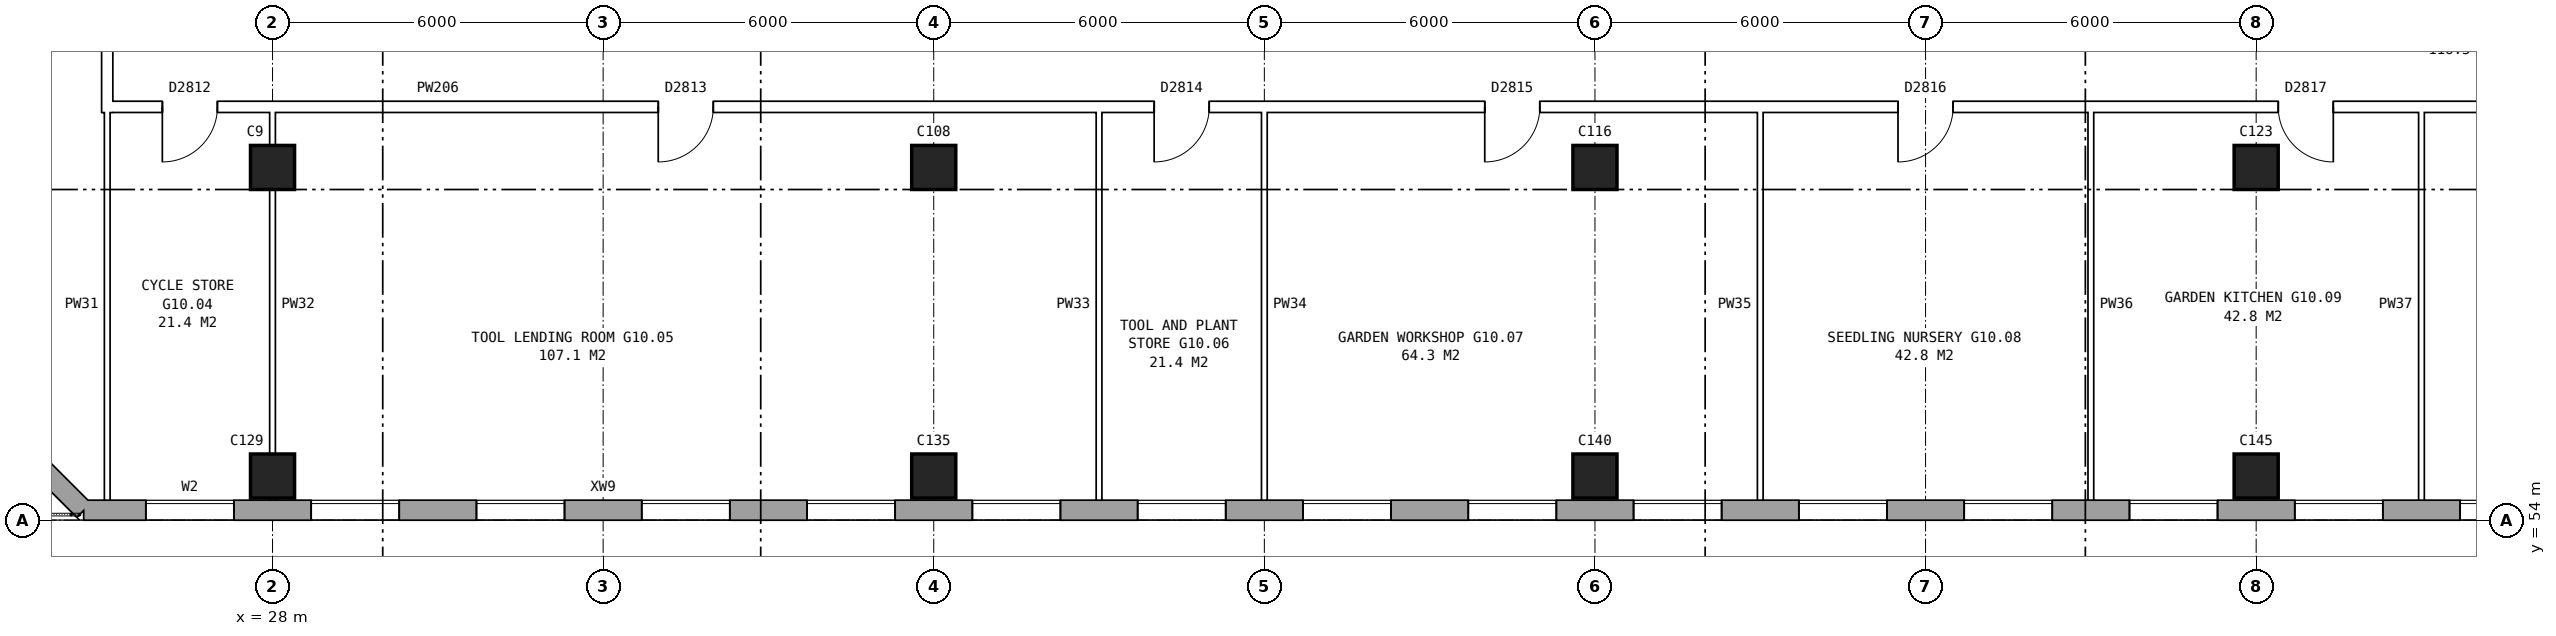
"""IFC4 building model, lengths in metres.
Left out: names, types, materials, properties, quantities, classifications, styles, units other than length and angle.
Written with IfcOpenShell. Run it as: python <this file> out.ifc"""

import sys

from ifc_helpers import new_model, si_unit, direction, frame, frame_2d, origin, origin_2d, place, context, subcontext, project, spatial, rectangle, extrude, element, fill, save


model = new_model("IFC4")
c1 = context("Model", 3, precision=1e-05, world=origin(), true_north=direction((0.0, 1.0)))
c2 = subcontext(c1, "Body", "Model", "MODEL_VIEW")
j1 = project(units=[si_unit("LENGTHUNIT", "METRE"), si_unit("PLANEANGLEUNIT", "RADIAN")], contexts=[c1])
p1 = place(None, origin())
s1 = spatial("IfcSite", under=j1, at=p1, CompositionType="ELEMENT")
p2 = place(p1, origin())
s2 = spatial("IfcBuilding", under=s1, at=p2, CompositionType="ELEMENT")
p3 = place(p2, frame((0.0, 0.0, 38.1)))
s3 = spatial("IfcBuildingStorey", under=s2, at=p3, CompositionType="ELEMENT", Elevation=38.1)
for number, where, z_axis, x_axis in (
    (1, (28.0, 54.8, 0.0), (0.0, 0.0, 1.0), (1.0, 0.0, 0.0)),
    (2, (28.0, 60.4, 0.0), (0.0, 0.0, 1.0), (1.0, 0.0, 0.0)),
    (3, (40.0, 54.8, 0.0), (0.0, 0.0, 1.0), (1.0, 0.0, 0.0)),
    (4, (40.0, 60.4, 0.0), (0.0, 0.0, 1.0), (1.0, 0.0, 0.0)),
    (5, (52.0, 54.8, 0.0), (0.0, 0.0, 1.0), (1.0, 0.0, 0.0)),
    (6, (52.0, 60.4, 0.0), (0.0, 0.0, 1.0), (1.0, 0.0, 0.0)),
    (7, (64.0, 54.8, 0.0), (0.0, 0.0, 1.0), (1.0, 0.0, 0.0)),
    (8, (64.0, 60.4, 0.0), (0.0, 0.0, 1.0), (1.0, 0.0, 0.0)),
):
    element("IfcColumn", number, at=place(p3, frame(where, z_axis=z_axis, x_axis=x_axis)), inside=s3, PredefinedType="COLUMN", context=c2, shape_type="SweptSolid", body=[
        extrude(rectangle(XDim=0.8, YDim=0.8, at=origin_2d()), origin(), (0.0, 0.0, 1.0), 5.6),
    ])
p4 = place(p3, frame((21.68, 57.075, 0.0), z_axis=(0.0, 0.0, 1.0), x_axis=(0.707106781187, -0.707106781187, 0.0)))
e9 = element("IfcWall", 9, at=p4, inside=s3, PredefinedType="STANDARD", context=c2, shape_type="SweptSolid", body=[
    extrude(rectangle(XDim=4.094, YDim=0.36, at=frame_2d((2.047, 0.0))), origin(), (0.0, 0.0, 1.0), 5.6),
])
p5 = place(p3, frame((24.575, 54.18, 0.0), z_axis=(0.0, 0.0, 1.0), x_axis=(1.0, 0.0, 0.0)))
e10 = element("IfcWall", 10, at=p5, inside=s3, PredefinedType="STANDARD", context=c2, shape_type="SweptSolid", body=[
    extrude(rectangle(XDim=48.351, YDim=0.36, at=frame_2d((24.175, 0.0))), origin(), (0.0, 0.0, 1.0), 5.6),
])
p6 = place(p5, frame((1.125, 0.0, 0.15)))
e11 = element("IfcOpeningElement", 11, at=p6, cuts=e10, PredefinedType="OPENING", context=c2, shape_type="SweptSolid", body=[
    extrude(rectangle(XDim=1.6, YDim=2.4, at=frame_2d((0.8, 1.2))), frame((0.0, 0.19, 0.0), z_axis=(0.0, -1.0, 0.0), x_axis=(1.0, 0.0, 0.0)), (0.0, 0.0, 1.0), 0.38),
])
p7 = place(p5, frame((4.125, 0.0, 0.15)))
e12 = element("IfcOpeningElement", 12, at=p7, cuts=e10, PredefinedType="OPENING", context=c2, shape_type="SweptSolid", body=[
    extrude(rectangle(XDim=1.6, YDim=2.4, at=frame_2d((0.8, 1.2))), frame((0.0, 0.19, 0.0), z_axis=(0.0, -1.0, 0.0), x_axis=(1.0, 0.0, 0.0)), (0.0, 0.0, 1.0), 0.38),
])
p8 = place(p5, frame((7.125, 0.0, 0.15)))
e13 = element("IfcOpeningElement", 13, at=p8, cuts=e10, PredefinedType="OPENING", context=c2, shape_type="SweptSolid", body=[
    extrude(rectangle(XDim=1.6, YDim=2.4, at=frame_2d((0.8, 1.2))), frame((0.0, 0.19, 0.0), z_axis=(0.0, -1.0, 0.0), x_axis=(1.0, 0.0, 0.0)), (0.0, 0.0, 1.0), 0.38),
])
p9 = place(p5, frame((10.125, 0.0, 0.15)))
e14 = element("IfcOpeningElement", 14, at=p9, cuts=e10, PredefinedType="OPENING", context=c2, shape_type="SweptSolid", body=[
    extrude(rectangle(XDim=1.6, YDim=2.4, at=frame_2d((0.8, 1.2))), frame((0.0, 0.19, 0.0), z_axis=(0.0, -1.0, 0.0), x_axis=(1.0, 0.0, 0.0)), (0.0, 0.0, 1.0), 0.38),
])
p10 = place(p5, frame((13.125, 0.0, 0.15)))
e15 = element("IfcOpeningElement", 15, at=p10, cuts=e10, PredefinedType="OPENING", context=c2, shape_type="SweptSolid", body=[
    extrude(rectangle(XDim=1.6, YDim=2.4, at=frame_2d((0.8, 1.2))), frame((0.0, 0.19, 0.0), z_axis=(0.0, -1.0, 0.0), x_axis=(1.0, 0.0, 0.0)), (0.0, 0.0, 1.0), 0.38),
])
p11 = place(p5, frame((16.125, 0.0, 0.15)))
e16 = element("IfcOpeningElement", 16, at=p11, cuts=e10, PredefinedType="OPENING", context=c2, shape_type="SweptSolid", body=[
    extrude(rectangle(XDim=1.6, YDim=2.4, at=frame_2d((0.8, 1.2))), frame((0.0, 0.19, 0.0), z_axis=(0.0, -1.0, 0.0), x_axis=(1.0, 0.0, 0.0)), (0.0, 0.0, 1.0), 0.38),
])
p12 = place(p5, frame((19.125, 0.0, 0.15)))
e17 = element("IfcOpeningElement", 17, at=p12, cuts=e10, PredefinedType="OPENING", context=c2, shape_type="SweptSolid", body=[
    extrude(rectangle(XDim=1.6, YDim=2.4, at=frame_2d((0.8, 1.2))), frame((0.0, 0.19, 0.0), z_axis=(0.0, -1.0, 0.0), x_axis=(1.0, 0.0, 0.0)), (0.0, 0.0, 1.0), 0.38),
])
p13 = place(p5, frame((22.125, 0.0, 0.15)))
e18 = element("IfcOpeningElement", 18, at=p13, cuts=e10, PredefinedType="OPENING", context=c2, shape_type="SweptSolid", body=[
    extrude(rectangle(XDim=1.6, YDim=2.4, at=frame_2d((0.8, 1.2))), frame((0.0, 0.19, 0.0), z_axis=(0.0, -1.0, 0.0), x_axis=(1.0, 0.0, 0.0)), (0.0, 0.0, 1.0), 0.38),
])
p14 = place(p5, frame((25.125, 0.0, 0.15)))
e19 = element("IfcOpeningElement", 19, at=p14, cuts=e10, PredefinedType="OPENING", context=c2, shape_type="SweptSolid", body=[
    extrude(rectangle(XDim=1.6, YDim=2.4, at=frame_2d((0.8, 1.2))), frame((0.0, 0.19, 0.0), z_axis=(0.0, -1.0, 0.0), x_axis=(1.0, 0.0, 0.0)), (0.0, 0.0, 1.0), 0.38),
])
p15 = place(p5, frame((28.125, 0.0, 0.15)))
e20 = element("IfcOpeningElement", 20, at=p15, cuts=e10, PredefinedType="OPENING", context=c2, shape_type="SweptSolid", body=[
    extrude(rectangle(XDim=1.6, YDim=2.4, at=frame_2d((0.8, 1.2))), frame((0.0, 0.19, 0.0), z_axis=(0.0, -1.0, 0.0), x_axis=(1.0, 0.0, 0.0)), (0.0, 0.0, 1.0), 0.38),
])
p16 = place(p5, frame((31.125, 0.0, 0.15)))
e21 = element("IfcOpeningElement", 21, at=p16, cuts=e10, PredefinedType="OPENING", context=c2, shape_type="SweptSolid", body=[
    extrude(rectangle(XDim=1.6, YDim=2.4, at=frame_2d((0.8, 1.2))), frame((0.0, 0.19, 0.0), z_axis=(0.0, -1.0, 0.0), x_axis=(1.0, 0.0, 0.0)), (0.0, 0.0, 1.0), 0.38),
])
p17 = place(p5, frame((34.125, 0.0, 0.15)))
e22 = element("IfcOpeningElement", 22, at=p17, cuts=e10, PredefinedType="OPENING", context=c2, shape_type="SweptSolid", body=[
    extrude(rectangle(XDim=1.6, YDim=2.4, at=frame_2d((0.8, 1.2))), frame((0.0, 0.19, 0.0), z_axis=(0.0, -1.0, 0.0), x_axis=(1.0, 0.0, 0.0)), (0.0, 0.0, 1.0), 0.38),
])
p18 = place(p5, frame((37.125, 0.0, 0.15)))
e23 = element("IfcOpeningElement", 23, at=p18, cuts=e10, PredefinedType="OPENING", context=c2, shape_type="SweptSolid", body=[
    extrude(rectangle(XDim=1.6, YDim=2.4, at=frame_2d((0.8, 1.2))), frame((0.0, 0.19, 0.0), z_axis=(0.0, -1.0, 0.0), x_axis=(1.0, 0.0, 0.0)), (0.0, 0.0, 1.0), 0.38),
])
p19 = place(p5, frame((40.125, 0.0, 0.15)))
e24 = element("IfcOpeningElement", 24, at=p19, cuts=e10, PredefinedType="OPENING", context=c2, shape_type="SweptSolid", body=[
    extrude(rectangle(XDim=1.6, YDim=2.4, at=frame_2d((0.8, 1.2))), frame((0.0, 0.19, 0.0), z_axis=(0.0, -1.0, 0.0), x_axis=(1.0, 0.0, 0.0)), (0.0, 0.0, 1.0), 0.38),
])
p20 = place(p5, frame((43.125, 0.0, 0.15)))
e25 = element("IfcOpeningElement", 25, at=p20, cuts=e10, PredefinedType="OPENING", context=c2, shape_type="SweptSolid", body=[
    extrude(rectangle(XDim=1.6, YDim=2.4, at=frame_2d((0.8, 1.2))), frame((0.0, 0.19, 0.0), z_axis=(0.0, -1.0, 0.0), x_axis=(1.0, 0.0, 0.0)), (0.0, 0.0, 1.0), 0.38),
])
p21 = place(p5, frame((46.125, 0.0, 0.15)))
e26 = element("IfcOpeningElement", 26, at=p21, cuts=e10, PredefinedType="OPENING", context=c2, shape_type="SweptSolid", body=[
    extrude(rectangle(XDim=1.6, YDim=2.4, at=frame_2d((0.8, 1.2))), frame((0.0, 0.19, 0.0), z_axis=(0.0, -1.0, 0.0), x_axis=(1.0, 0.0, 0.0)), (0.0, 0.0, 1.0), 0.38),
])
p22 = place(p3, frame((24.9, 61.5, 0.0), z_axis=(0.0, 0.0, 1.0), x_axis=(1.0, 0.0, 0.0)))
e27 = element("IfcWall", 27, at=p22, inside=s3, PredefinedType="PARTITIONING", context=c2, shape_type="SweptSolid", body=[
    extrude(rectangle(XDim=50.86, YDim=0.2, at=frame_2d((25.43, 0.0))), origin(), (0.0, 0.0, 1.0), 5.6),
])
p23 = place(p22, frame((1.1, 0.0, 0.0)))
e28 = element("IfcOpeningElement", 28, at=p23, cuts=e27, PredefinedType="OPENING", context=c2, shape_type="SweptSolid", body=[
    extrude(rectangle(XDim=1.0, YDim=2.1, at=frame_2d((0.5, 1.05))), frame((0.0, 0.11, 0.0), z_axis=(0.0, -1.0, 0.0), x_axis=(1.0, 0.0, 0.0)), (0.0, 0.0, 1.0), 0.22),
])
p24 = place(p22, frame((10.1, 0.0, 0.0)))
e29 = element("IfcOpeningElement", 29, at=p24, cuts=e27, PredefinedType="OPENING", context=c2, shape_type="SweptSolid", body=[
    extrude(rectangle(XDim=1.0, YDim=2.1, at=frame_2d((0.5, 1.05))), frame((0.0, 0.11, 0.0), z_axis=(0.0, -1.0, 0.0), x_axis=(1.0, 0.0, 0.0)), (0.0, 0.0, 1.0), 0.22),
])
p25 = place(p22, frame((19.1, 0.0, 0.0)))
e30 = element("IfcOpeningElement", 30, at=p25, cuts=e27, PredefinedType="OPENING", context=c2, shape_type="SweptSolid", body=[
    extrude(rectangle(XDim=1.0, YDim=2.1, at=frame_2d((0.5, 1.05))), frame((0.0, 0.11, 0.0), z_axis=(0.0, -1.0, 0.0), x_axis=(1.0, 0.0, 0.0)), (0.0, 0.0, 1.0), 0.22),
])
p26 = place(p22, frame((25.1, 0.0, 0.0)))
e31 = element("IfcOpeningElement", 31, at=p26, cuts=e27, PredefinedType="OPENING", context=c2, shape_type="SweptSolid", body=[
    extrude(rectangle(XDim=1.0, YDim=2.1, at=frame_2d((0.5, 1.05))), frame((0.0, 0.11, 0.0), z_axis=(0.0, -1.0, 0.0), x_axis=(1.0, 0.0, 0.0)), (0.0, 0.0, 1.0), 0.22),
])
p27 = place(p22, frame((32.6, 0.0, 0.0)))
e32 = element("IfcOpeningElement", 32, at=p27, cuts=e27, PredefinedType="OPENING", context=c2, shape_type="SweptSolid", body=[
    extrude(rectangle(XDim=1.0, YDim=2.1, at=frame_2d((0.5, 1.05))), frame((0.0, 0.11, 0.0), z_axis=(0.0, -1.0, 0.0), x_axis=(1.0, 0.0, 0.0)), (0.0, 0.0, 1.0), 0.22),
])
p28 = place(p22, frame((39.5, 0.0, 0.0)))
e33 = element("IfcOpeningElement", 33, at=p28, cuts=e27, PredefinedType="OPENING", context=c2, shape_type="SweptSolid", body=[
    extrude(rectangle(XDim=1.0, YDim=2.1, at=frame_2d((0.5, 1.05))), frame((0.0, 0.11, 0.0), z_axis=(0.0, -1.0, 0.0), x_axis=(1.0, 0.0, 0.0)), (0.0, 0.0, 1.0), 0.22),
])
p29 = place(p22, frame((45.92, 0.0, 0.0)))
e34 = element("IfcOpeningElement", 34, at=p29, cuts=e27, PredefinedType="OPENING", context=c2, shape_type="SweptSolid", body=[
    extrude(rectangle(XDim=1.0, YDim=2.1, at=frame_2d((0.5, 1.05))), frame((0.0, 0.11, 0.0), z_axis=(0.0, -1.0, 0.0), x_axis=(1.0, 0.0, 0.0)), (0.0, 0.0, 1.0), 0.22),
])
p30 = place(p3, frame((25.0, 61.398, 0.0), z_axis=(0.0, 0.0, 1.0), x_axis=(0.0, 1.0, 0.0)))
e35 = element("IfcWall", 35, at=p30, inside=s3, PredefinedType="PARTITIONING", context=c2, shape_type="SweptSolid", body=[
    extrude(rectangle(XDim=2.502, YDim=0.2, at=frame_2d((1.251, 0.0))), origin(), (0.0, 0.0, 1.0), 5.6),
])
for number, where, z_axis, x_axis in (
    (36, (25.0, 54.24, 0.0), (0.0, 0.0, 1.0), (0.0, 1.0, 0.0)),
    (37, (28.0, 54.24, 0.0), (0.0, 0.0, 1.0), (0.0, 1.0, 0.0)),
    (38, (43.0, 54.24, 0.0), (0.0, 0.0, 1.0), (0.0, 1.0, 0.0)),
    (39, (46.0, 54.24, 0.0), (0.0, 0.0, 1.0), (0.0, 1.0, 0.0)),
    (40, (55.0, 54.24, 0.0), (0.0, 0.0, 1.0), (0.0, 1.0, 0.0)),
    (41, (61.0, 54.24, 0.0), (0.0, 0.0, 1.0), (0.0, 1.0, 0.0)),
    (42, (67.0, 54.24, 0.0), (0.0, 0.0, 1.0), (0.0, 1.0, 0.0)),
):
    element("IfcWall", number, at=place(p3, frame(where, z_axis=z_axis, x_axis=x_axis)), inside=s3, PredefinedType="PARTITIONING", context=c2, shape_type="SweptSolid", body=[
        extrude(rectangle(XDim=7.36, YDim=0.1, at=frame_2d((3.68, 0.0))), origin(), (0.0, 0.0, 1.0), 5.6),
    ])
p31 = place(p6, origin())
e43 = element("IfcWindow", 43, at=p31, inside=s3, PartitioningType="SINGLE_PANEL", PredefinedType="WINDOW", context=c2, shape_type="SweptSolid", body=[
    extrude(rectangle(XDim=1.6, YDim=2.4, at=frame_2d((0.8, 1.2))), frame((0.0, 0.15, 0.0), z_axis=(0.0, -1.0, 0.0), x_axis=(1.0, 0.0, 0.0)), (0.0, 0.0, 1.0), 0.06),
])
fill(e11, e43)
p32 = place(p7, origin())
e44 = element("IfcWindow", 44, at=p32, inside=s3, PartitioningType="SINGLE_PANEL", PredefinedType="WINDOW", context=c2, shape_type="SweptSolid", body=[
    extrude(rectangle(XDim=1.6, YDim=2.4, at=frame_2d((0.8, 1.2))), frame((0.0, 0.15, 0.0), z_axis=(0.0, -1.0, 0.0), x_axis=(1.0, 0.0, 0.0)), (0.0, 0.0, 1.0), 0.06),
])
fill(e12, e44)
p33 = place(p8, origin())
e45 = element("IfcWindow", 45, at=p33, inside=s3, PartitioningType="SINGLE_PANEL", PredefinedType="WINDOW", context=c2, shape_type="SweptSolid", body=[
    extrude(rectangle(XDim=1.6, YDim=2.4, at=frame_2d((0.8, 1.2))), frame((0.0, 0.15, 0.0), z_axis=(0.0, -1.0, 0.0), x_axis=(1.0, 0.0, 0.0)), (0.0, 0.0, 1.0), 0.06),
])
fill(e13, e45)
p34 = place(p9, origin())
e46 = element("IfcWindow", 46, at=p34, inside=s3, PartitioningType="SINGLE_PANEL", PredefinedType="WINDOW", context=c2, shape_type="SweptSolid", body=[
    extrude(rectangle(XDim=1.6, YDim=2.4, at=frame_2d((0.8, 1.2))), frame((0.0, 0.15, 0.0), z_axis=(0.0, -1.0, 0.0), x_axis=(1.0, 0.0, 0.0)), (0.0, 0.0, 1.0), 0.06),
])
fill(e14, e46)
p35 = place(p10, origin())
e47 = element("IfcWindow", 47, at=p35, inside=s3, PartitioningType="SINGLE_PANEL", PredefinedType="WINDOW", context=c2, shape_type="SweptSolid", body=[
    extrude(rectangle(XDim=1.6, YDim=2.4, at=frame_2d((0.8, 1.2))), frame((0.0, 0.15, 0.0), z_axis=(0.0, -1.0, 0.0), x_axis=(1.0, 0.0, 0.0)), (0.0, 0.0, 1.0), 0.06),
])
fill(e15, e47)
p36 = place(p11, origin())
e48 = element("IfcWindow", 48, at=p36, inside=s3, PartitioningType="SINGLE_PANEL", PredefinedType="WINDOW", context=c2, shape_type="SweptSolid", body=[
    extrude(rectangle(XDim=1.6, YDim=2.4, at=frame_2d((0.8, 1.2))), frame((0.0, 0.15, 0.0), z_axis=(0.0, -1.0, 0.0), x_axis=(1.0, 0.0, 0.0)), (0.0, 0.0, 1.0), 0.06),
])
fill(e16, e48)
p37 = place(p12, origin())
e49 = element("IfcWindow", 49, at=p37, inside=s3, PartitioningType="SINGLE_PANEL", PredefinedType="WINDOW", context=c2, shape_type="SweptSolid", body=[
    extrude(rectangle(XDim=1.6, YDim=2.4, at=frame_2d((0.8, 1.2))), frame((0.0, 0.15, 0.0), z_axis=(0.0, -1.0, 0.0), x_axis=(1.0, 0.0, 0.0)), (0.0, 0.0, 1.0), 0.06),
])
fill(e17, e49)
p38 = place(p13, origin())
e50 = element("IfcWindow", 50, at=p38, inside=s3, PartitioningType="SINGLE_PANEL", PredefinedType="WINDOW", context=c2, shape_type="SweptSolid", body=[
    extrude(rectangle(XDim=1.6, YDim=2.4, at=frame_2d((0.8, 1.2))), frame((0.0, 0.15, 0.0), z_axis=(0.0, -1.0, 0.0), x_axis=(1.0, 0.0, 0.0)), (0.0, 0.0, 1.0), 0.06),
])
fill(e18, e50)
p39 = place(p14, origin())
e51 = element("IfcWindow", 51, at=p39, inside=s3, PartitioningType="SINGLE_PANEL", PredefinedType="WINDOW", context=c2, shape_type="SweptSolid", body=[
    extrude(rectangle(XDim=1.6, YDim=2.4, at=frame_2d((0.8, 1.2))), frame((0.0, 0.15, 0.0), z_axis=(0.0, -1.0, 0.0), x_axis=(1.0, 0.0, 0.0)), (0.0, 0.0, 1.0), 0.06),
])
fill(e19, e51)
p40 = place(p15, origin())
e52 = element("IfcWindow", 52, at=p40, inside=s3, PartitioningType="SINGLE_PANEL", PredefinedType="WINDOW", context=c2, shape_type="SweptSolid", body=[
    extrude(rectangle(XDim=1.6, YDim=2.4, at=frame_2d((0.8, 1.2))), frame((0.0, 0.15, 0.0), z_axis=(0.0, -1.0, 0.0), x_axis=(1.0, 0.0, 0.0)), (0.0, 0.0, 1.0), 0.06),
])
fill(e20, e52)
p41 = place(p16, origin())
e53 = element("IfcWindow", 53, at=p41, inside=s3, PartitioningType="SINGLE_PANEL", PredefinedType="WINDOW", context=c2, shape_type="SweptSolid", body=[
    extrude(rectangle(XDim=1.6, YDim=2.4, at=frame_2d((0.8, 1.2))), frame((0.0, 0.15, 0.0), z_axis=(0.0, -1.0, 0.0), x_axis=(1.0, 0.0, 0.0)), (0.0, 0.0, 1.0), 0.06),
])
fill(e21, e53)
p42 = place(p17, origin())
e54 = element("IfcWindow", 54, at=p42, inside=s3, PartitioningType="SINGLE_PANEL", PredefinedType="WINDOW", context=c2, shape_type="SweptSolid", body=[
    extrude(rectangle(XDim=1.6, YDim=2.4, at=frame_2d((0.8, 1.2))), frame((0.0, 0.15, 0.0), z_axis=(0.0, -1.0, 0.0), x_axis=(1.0, 0.0, 0.0)), (0.0, 0.0, 1.0), 0.06),
])
fill(e22, e54)
p43 = place(p18, origin())
e55 = element("IfcWindow", 55, at=p43, inside=s3, PartitioningType="SINGLE_PANEL", PredefinedType="WINDOW", context=c2, shape_type="SweptSolid", body=[
    extrude(rectangle(XDim=1.6, YDim=2.4, at=frame_2d((0.8, 1.2))), frame((0.0, 0.15, 0.0), z_axis=(0.0, -1.0, 0.0), x_axis=(1.0, 0.0, 0.0)), (0.0, 0.0, 1.0), 0.06),
])
fill(e23, e55)
p44 = place(p19, origin())
e56 = element("IfcWindow", 56, at=p44, inside=s3, PartitioningType="SINGLE_PANEL", PredefinedType="WINDOW", context=c2, shape_type="SweptSolid", body=[
    extrude(rectangle(XDim=1.6, YDim=2.4, at=frame_2d((0.8, 1.2))), frame((0.0, 0.15, 0.0), z_axis=(0.0, -1.0, 0.0), x_axis=(1.0, 0.0, 0.0)), (0.0, 0.0, 1.0), 0.06),
])
fill(e24, e56)
p45 = place(p20, origin())
e57 = element("IfcWindow", 57, at=p45, inside=s3, PartitioningType="SINGLE_PANEL", PredefinedType="WINDOW", context=c2, shape_type="SweptSolid", body=[
    extrude(rectangle(XDim=1.6, YDim=2.4, at=frame_2d((0.8, 1.2))), frame((0.0, 0.15, 0.0), z_axis=(0.0, -1.0, 0.0), x_axis=(1.0, 0.0, 0.0)), (0.0, 0.0, 1.0), 0.06),
])
fill(e25, e57)
p46 = place(p23, frame((1.0, 0.0, 0.0), z_axis=(0.0, 0.0, 1.0), x_axis=(-1.0, 0.0, 0.0)))
e58 = element("IfcDoor", 58, at=p46, inside=s3, OperationType="SINGLE_SWING_RIGHT", PredefinedType="DOOR", context=c2, shape_type="SweptSolid", body=[
    extrude(rectangle(XDim=1.0, YDim=2.1, at=frame_2d((0.5, 1.05))), frame((0.0, 0.025, 0.0), z_axis=(0.0, -1.0, 0.0), x_axis=(1.0, 0.0, 0.0)), (0.0, 0.0, 1.0), 0.05),
])
fill(e28, e58)
p47 = place(p24, frame((1.0, 0.0, 0.0), z_axis=(0.0, 0.0, 1.0), x_axis=(-1.0, 0.0, 0.0)))
e59 = element("IfcDoor", 59, at=p47, inside=s3, OperationType="SINGLE_SWING_RIGHT", PredefinedType="DOOR", context=c2, shape_type="SweptSolid", body=[
    extrude(rectangle(XDim=1.0, YDim=2.1, at=frame_2d((0.5, 1.05))), frame((0.0, 0.025, 0.0), z_axis=(0.0, -1.0, 0.0), x_axis=(1.0, 0.0, 0.0)), (0.0, 0.0, 1.0), 0.05),
])
fill(e29, e59)
p48 = place(p25, frame((1.0, 0.0, 0.0), z_axis=(0.0, 0.0, 1.0), x_axis=(-1.0, 0.0, 0.0)))
e60 = element("IfcDoor", 60, at=p48, inside=s3, OperationType="SINGLE_SWING_RIGHT", PredefinedType="DOOR", context=c2, shape_type="SweptSolid", body=[
    extrude(rectangle(XDim=1.0, YDim=2.1, at=frame_2d((0.5, 1.05))), frame((0.0, 0.025, 0.0), z_axis=(0.0, -1.0, 0.0), x_axis=(1.0, 0.0, 0.0)), (0.0, 0.0, 1.0), 0.05),
])
fill(e30, e60)
p49 = place(p26, frame((1.0, 0.0, 0.0), z_axis=(0.0, 0.0, 1.0), x_axis=(-1.0, 0.0, 0.0)))
e61 = element("IfcDoor", 61, at=p49, inside=s3, OperationType="SINGLE_SWING_RIGHT", PredefinedType="DOOR", context=c2, shape_type="SweptSolid", body=[
    extrude(rectangle(XDim=1.0, YDim=2.1, at=frame_2d((0.5, 1.05))), frame((0.0, 0.025, 0.0), z_axis=(0.0, -1.0, 0.0), x_axis=(1.0, 0.0, 0.0)), (0.0, 0.0, 1.0), 0.05),
])
fill(e31, e61)
p50 = place(p27, frame((1.0, 0.0, 0.0), z_axis=(0.0, 0.0, 1.0), x_axis=(-1.0, 0.0, 0.0)))
e62 = element("IfcDoor", 62, at=p50, inside=s3, OperationType="SINGLE_SWING_RIGHT", PredefinedType="DOOR", context=c2, shape_type="SweptSolid", body=[
    extrude(rectangle(XDim=1.0, YDim=2.1, at=frame_2d((0.5, 1.05))), frame((0.0, 0.025, 0.0), z_axis=(0.0, -1.0, 0.0), x_axis=(1.0, 0.0, 0.0)), (0.0, 0.0, 1.0), 0.05),
])
fill(e32, e62)
p51 = place(p28, frame((1.0, 0.0, 0.0), z_axis=(0.0, 0.0, 1.0), x_axis=(-1.0, 0.0, 0.0)))
e63 = element("IfcDoor", 63, at=p51, inside=s3, OperationType="SINGLE_SWING_LEFT", PredefinedType="DOOR", context=c2, shape_type="SweptSolid", body=[
    extrude(rectangle(XDim=1.0, YDim=2.1, at=frame_2d((0.5, 1.05))), frame((0.0, 0.025, 0.0), z_axis=(0.0, -1.0, 0.0), x_axis=(1.0, 0.0, 0.0)), (0.0, 0.0, 1.0), 0.05),
])
fill(e33, e63)
save(model, sys.argv[1])
